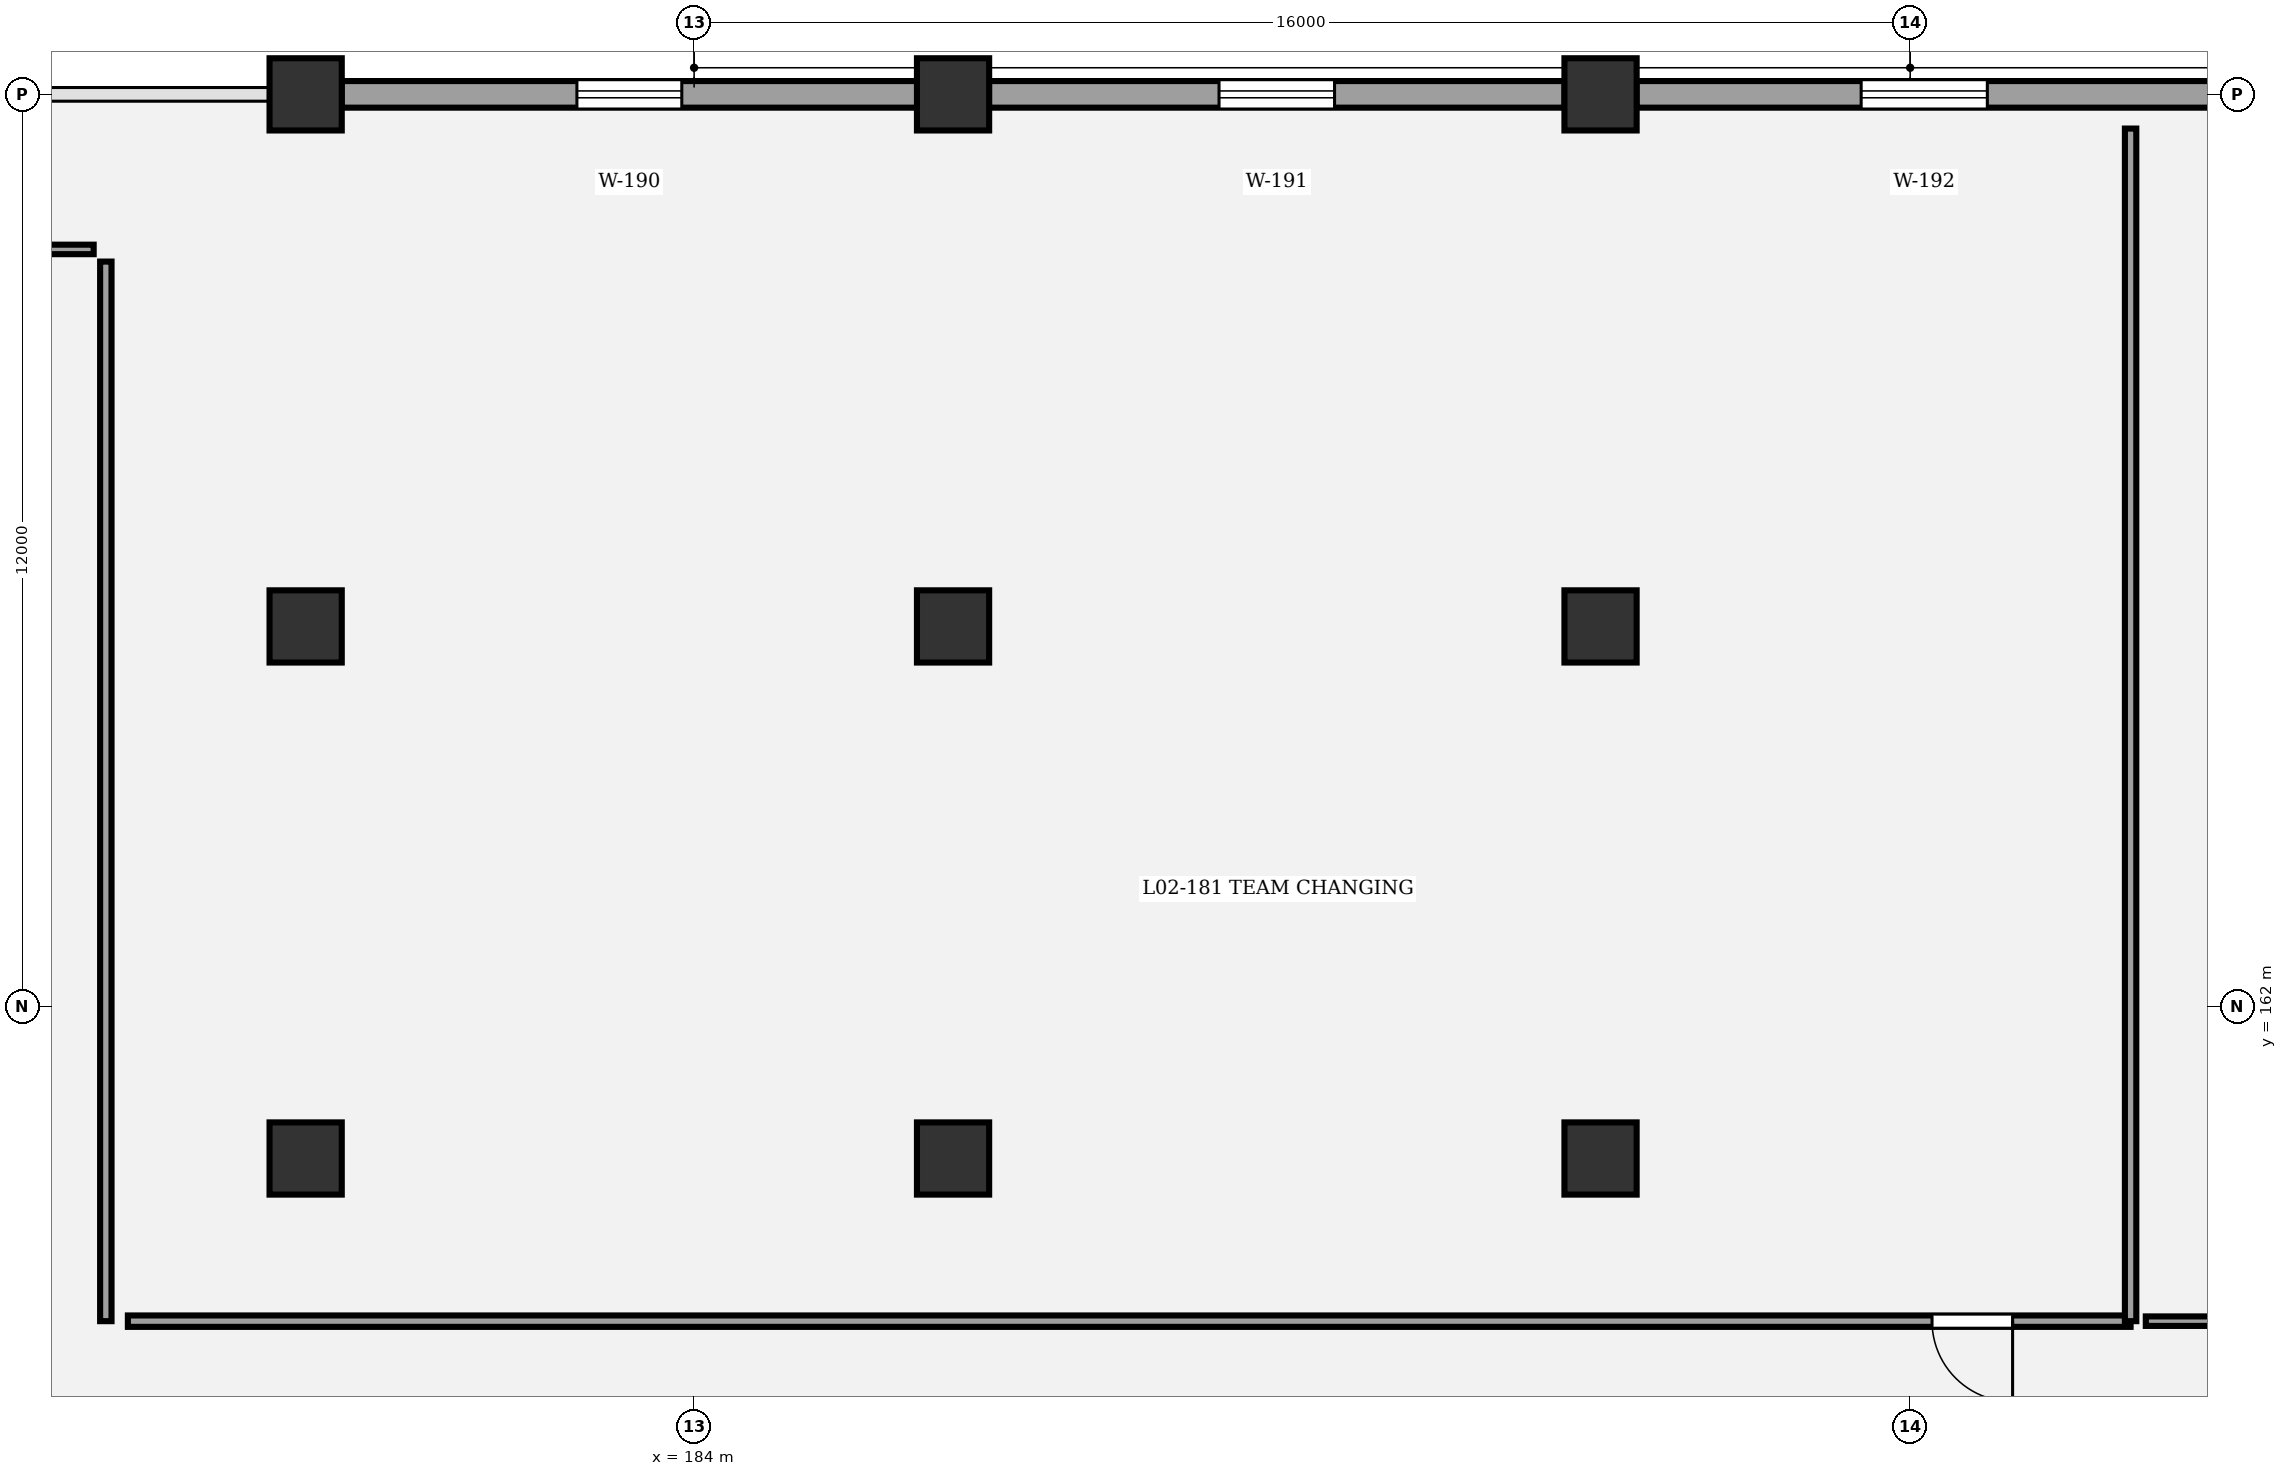
"""IFC4 building model, lengths in metres.
Left out: names, types, materials, properties, quantities, classifications, styles, units other than length and angle.
Written with IfcOpenShell. Run it as: python <this file> out.ifc"""

import sys

from ifc_helpers import new_model, si_unit, direction, frame, frame_2d, origin, origin_2d, place, context, subcontext, project, spatial, rectangle, circle, extrude, element, fill, save


model = new_model("IFC4")
c1 = context("Model", 3, precision=1e-05, world=origin(), true_north=direction((0.0, 1.0)))
c2 = subcontext(c1, "Body", "Model", "MODEL_VIEW")
j1 = project(units=[si_unit("LENGTHUNIT", "METRE"), si_unit("PLANEANGLEUNIT", "RADIAN")], contexts=[c1])
p1 = place(None, origin())
s1 = spatial("IfcSite", under=j1, at=p1, CompositionType="ELEMENT")
p2 = place(p1, origin())
s2 = spatial("IfcBuilding", under=s1, at=p2, CompositionType="ELEMENT")
p3 = place(p2, frame((0.0, 0.0, 10.2)))
s3 = spatial("IfcBuildingStorey", under=s2, at=p3, CompositionType="ELEMENT", Elevation=10.2)
for number, where, z_axis, x_axis in (
    (1, (178.889, 160.0, 0.0), (0.0, 0.0, 1.0), (1.0, 0.0, 0.0)),
    (2, (178.889, 167.0, 0.0), (0.0, 0.0, 1.0), (1.0, 0.0, 0.0)),
    (3, (178.889, 174.0, 0.0), (0.0, 0.0, 1.0), (1.0, 0.0, 0.0)),
    (4, (187.407, 160.0, 0.0), (0.0, 0.0, 1.0), (1.0, 0.0, 0.0)),
    (5, (187.407, 167.0, 0.0), (0.0, 0.0, 1.0), (1.0, 0.0, 0.0)),
    (6, (187.407, 174.0, 0.0), (0.0, 0.0, 1.0), (1.0, 0.0, 0.0)),
    (7, (195.926, 160.0, 0.0), (0.0, 0.0, 1.0), (1.0, 0.0, 0.0)),
    (8, (195.926, 167.0, 0.0), (0.0, 0.0, 1.0), (1.0, 0.0, 0.0)),
    (9, (195.926, 174.0, 0.0), (0.0, 0.0, 1.0), (1.0, 0.0, 0.0)),
):
    element("IfcColumn", number, at=place(p3, frame(where, z_axis=z_axis, x_axis=x_axis)), inside=s3, PredefinedType="COLUMN", context=c2, shape_type="SweptSolid", body=[
        extrude(circle(Radius=0.475, at=origin_2d()), origin(), (0.0, 0.0, 1.0), 4.5),
    ])
p4 = place(p3, frame((179.362, 174.0, 0.0), z_axis=(0.0, 0.0, 1.0), x_axis=(1.0, 0.0, 0.0)))
e10 = element("IfcWall", 10, at=p4, inside=s3, PredefinedType="STANDARD", context=c2, shape_type="SweptSolid", body=[
    extrude(rectangle(XDim=7.572, YDim=0.35, at=frame_2d((3.786, 0.0))), origin(), (0.0, 0.0, 1.0), 3.26),
])
p5 = place(p4, frame((3.096, 0.0, 0.9)))
e11 = element("IfcOpeningElement", 11, at=p5, cuts=e10, PredefinedType="OPENING", context=c2, shape_type="SweptSolid", body=[
    extrude(rectangle(XDim=1.38, YDim=1.75, at=frame_2d((0.69, 0.875))), frame((0.0, 0.185, 0.0), z_axis=(0.0, -1.0, 0.0), x_axis=(1.0, 0.0, 0.0)), (0.0, 0.0, 1.0), 0.37),
])
p6 = place(p3, frame((187.88, 174.0, 0.0), z_axis=(0.0, 0.0, 1.0), x_axis=(1.0, 0.0, 0.0)))
e12 = element("IfcWall", 12, at=p6, inside=s3, PredefinedType="STANDARD", context=c2, shape_type="SweptSolid", body=[
    extrude(rectangle(XDim=7.573, YDim=0.35, at=frame_2d((3.787, 0.0))), origin(), (0.0, 0.0, 1.0), 3.26),
])
p7 = place(p6, frame((3.027, 0.0, 0.9)))
e13 = element("IfcOpeningElement", 13, at=p7, cuts=e12, PredefinedType="OPENING", context=c2, shape_type="SweptSolid", body=[
    extrude(rectangle(XDim=1.52, YDim=1.75, at=frame_2d((0.76, 0.875))), frame((0.0, 0.185, 0.0), z_axis=(0.0, -1.0, 0.0), x_axis=(1.0, 0.0, 0.0)), (0.0, 0.0, 1.0), 0.37),
])
p8 = place(p3, frame((196.399, 174.0, 0.0), z_axis=(0.0, 0.0, 1.0), x_axis=(1.0, 0.0, 0.0)))
e14 = element("IfcWall", 14, at=p8, inside=s3, PredefinedType="STANDARD", context=c2, shape_type="SweptSolid", body=[
    extrude(rectangle(XDim=7.572, YDim=0.35, at=frame_2d((3.786, 0.0))), origin(), (0.0, 0.0, 1.0), 3.26),
])
p9 = place(p8, frame((2.956, 0.0, 0.9)))
e15 = element("IfcOpeningElement", 15, at=p9, cuts=e14, PredefinedType="OPENING", context=c2, shape_type="SweptSolid", body=[
    extrude(rectangle(XDim=1.66, YDim=1.75, at=frame_2d((0.83, 0.875))), frame((0.0, 0.185, 0.0), z_axis=(0.0, -1.0, 0.0), x_axis=(1.0, 0.0, 0.0)), (0.0, 0.0, 1.0), 0.37),
])
p10 = place(p3, frame((176.1, 171.96, 0.0), z_axis=(0.0, 0.0, 1.0), x_axis=(-1.0, 0.0, 0.0)))
e16 = element("IfcWall", 16, at=p10, inside=s3, PredefinedType="PARTITIONING", context=c2, shape_type="SweptSolid", body=[
    extrude(rectangle(XDim=26.1, YDim=0.125, at=frame_2d((13.05, 0.0))), origin(), (0.0, 0.0, 1.0), 3.25),
])
p11 = place(p10, frame((1.544, 0.0, 0.0)))
e17 = element("IfcOpeningElement", 17, at=p11, cuts=e16, PredefinedType="OPENING", context=c2, shape_type="SweptSolid", body=[
    extrude(rectangle(XDim=0.98, YDim=2.3, at=frame_2d((0.49, 1.15))), frame((0.0, 0.073, 0.0), z_axis=(0.0, -1.0, 0.0), x_axis=(1.0, 0.0, 0.0)), (0.0, 0.0, 1.0), 0.145),
])
p12 = place(p3, frame((202.9, 157.86, 0.0), z_axis=(0.0, 0.0, 1.0), x_axis=(-1.0, 0.0, 0.0)))
e18 = element("IfcWall", 18, at=p12, inside=s3, PredefinedType="PARTITIONING", context=c2, shape_type="SweptSolid", body=[
    extrude(rectangle(XDim=26.35, YDim=0.15, at=frame_2d((13.175, 0.0))), origin(), (0.0, 0.0, 1.0), 3.25),
])
p13 = place(p12, frame((1.552, 0.0, 0.0)))
e19 = element("IfcOpeningElement", 19, at=p13, cuts=e18, PredefinedType="OPENING", context=c2, shape_type="SweptSolid", body=[
    extrude(rectangle(XDim=1.06, YDim=2.3, at=frame_2d((0.53, 1.15))), frame((0.0, 0.085, 0.0), z_axis=(0.0, -1.0, 0.0), x_axis=(1.0, 0.0, 0.0)), (0.0, 0.0, 1.0), 0.17),
])
p14 = place(p3, frame((216.5, 157.86, 0.0), z_axis=(0.0, 0.0, 1.0), x_axis=(-1.0, 0.0, 0.0)))
e20 = element("IfcWall", 20, at=p14, inside=s3, PredefinedType="PARTITIONING", context=c2, shape_type="SweptSolid", body=[
    extrude(rectangle(XDim=13.4, YDim=0.125, at=frame_2d((6.7, 0.0))), origin(), (0.0, 0.0, 1.0), 3.25),
])
p15 = place(p14, frame((7.899, 0.0, 0.0)))
e21 = element("IfcOpeningElement", 21, at=p15, cuts=e20, PredefinedType="OPENING", context=c2, shape_type="SweptSolid", body=[
    extrude(rectangle(XDim=1.1, YDim=2.3, at=frame_2d((0.55, 1.15))), frame((0.0, 0.073, 0.0), z_axis=(0.0, -1.0, 0.0), x_axis=(1.0, 0.0, 0.0)), (0.0, 0.0, 1.0), 0.145),
])
p16 = place(p3, frame((176.26, 157.86, 0.0), z_axis=(0.0, 0.0, 1.0), x_axis=(0.0, 1.0, 0.0)))
e22 = element("IfcWall", 22, at=p16, inside=s3, PredefinedType="PARTITIONING", context=c2, shape_type="SweptSolid", body=[
    extrude(rectangle(XDim=13.94, YDim=0.15, at=frame_2d((6.97, 0.0))), origin(), (0.0, 0.0, 1.0), 3.25),
])
p17 = place(p3, frame((202.9, 173.55, 0.0), z_axis=(0.0, 0.0, 1.0), x_axis=(0.0, -1.0, 0.0)))
e23 = element("IfcWall", 23, at=p17, inside=s3, PredefinedType="PARTITIONING", context=c2, shape_type="SweptSolid", body=[
    extrude(rectangle(XDim=15.69, YDim=0.15, at=frame_2d((7.845, 0.0))), origin(), (0.0, 0.0, 1.0), 3.25),
])
p18 = place(p5, origin())
e24 = element("IfcWindow", 24, at=p18, inside=s3, PartitioningType="SINGLE_PANEL", PredefinedType="WINDOW", context=c2, shape_type="SweptSolid", body=[
    extrude(rectangle(XDim=1.38, YDim=1.75, at=frame_2d((0.69, 0.875))), frame((0.0, 0.03, 0.0), z_axis=(0.0, -1.0, 0.0), x_axis=(1.0, 0.0, 0.0)), (0.0, 0.0, 1.0), 0.06),
])
fill(e11, e24)
p19 = place(p7, origin())
e25 = element("IfcWindow", 25, at=p19, inside=s3, PartitioningType="SINGLE_PANEL", PredefinedType="WINDOW", context=c2, shape_type="SweptSolid", body=[
    extrude(rectangle(XDim=1.52, YDim=1.75, at=frame_2d((0.76, 0.875))), frame((0.0, 0.03, 0.0), z_axis=(0.0, -1.0, 0.0), x_axis=(1.0, 0.0, 0.0)), (0.0, 0.0, 1.0), 0.06),
])
fill(e13, e25)
p20 = place(p9, origin())
e26 = element("IfcWindow", 26, at=p20, inside=s3, PartitioningType="SINGLE_PANEL", PredefinedType="WINDOW", context=c2, shape_type="SweptSolid", body=[
    extrude(rectangle(XDim=1.66, YDim=1.75, at=frame_2d((0.83, 0.875))), frame((0.0, 0.03, 0.0), z_axis=(0.0, -1.0, 0.0), x_axis=(1.0, 0.0, 0.0)), (0.0, 0.0, 1.0), 0.06),
])
fill(e15, e26)
p21 = place(p13, origin())
e27 = element("IfcDoor", 27, at=p21, inside=s3, OperationType="SINGLE_SWING_LEFT", PredefinedType="DOOR", context=c2, shape_type="SweptSolid", body=[
    extrude(rectangle(XDim=1.06, YDim=2.3, at=frame_2d((0.53, 1.15))), frame((0.0, 0.025, 0.0), z_axis=(0.0, -1.0, 0.0), x_axis=(1.0, 0.0, 0.0)), (0.0, 0.0, 1.0), 0.05),
])
fill(e19, e27)
save(model, sys.argv[1])
